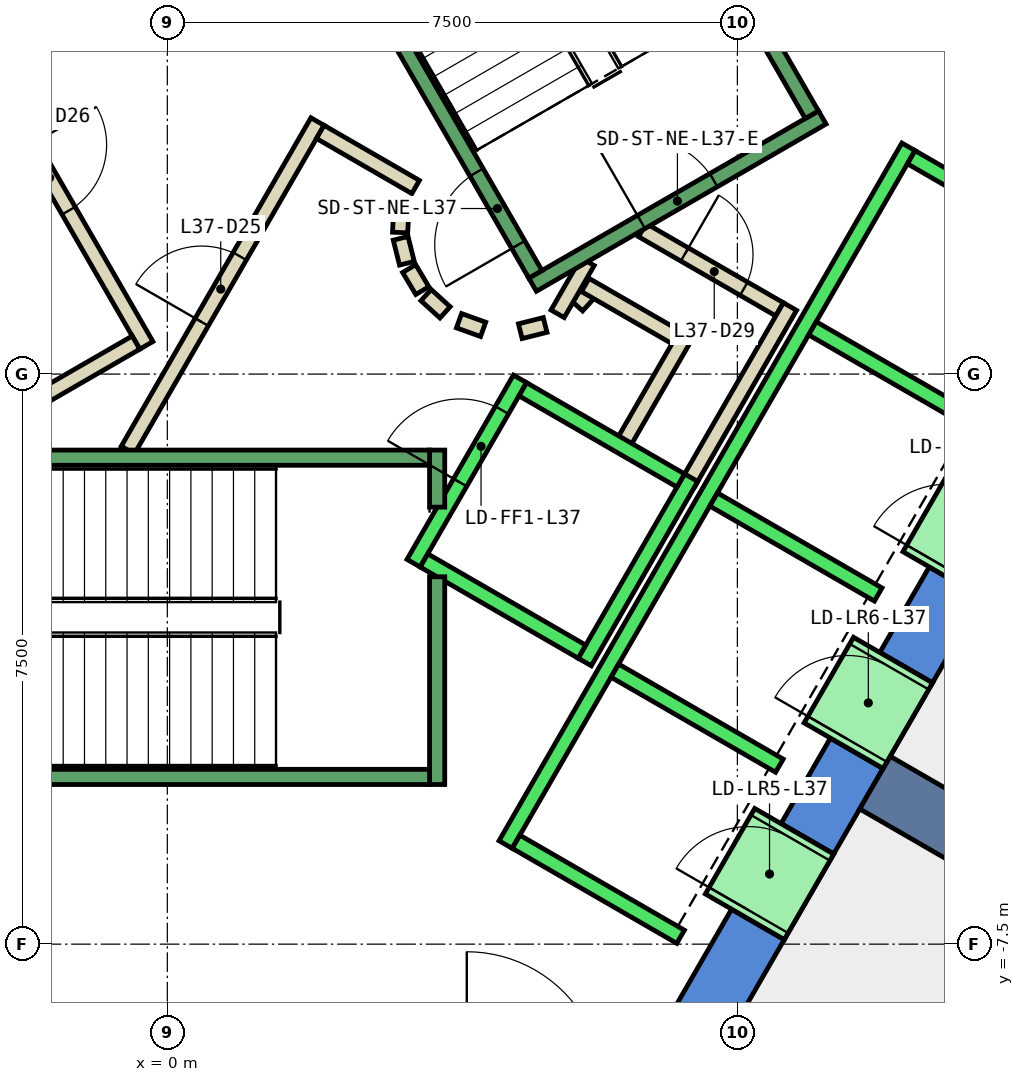
"""IFC4 building model, lengths in metres.
Left out: names, types, materials, properties, quantities, classifications, styles, units other than length and angle.
Written with IfcOpenShell. Run it as: python <this file> out.ifc"""

import sys

from ifc_helpers import new_model, si_unit, direction, frame, frame_2d, origin, place, context, subcontext, project, spatial, polyline, rectangle, outline, extrude, element, fill, save


model = new_model("IFC4")
c1 = context("Model", 3, precision=1e-05, world=origin(), true_north=direction((0.0, 1.0)))
c2 = subcontext(c1, "Body", "Model", "MODEL_VIEW")
j1 = project(units=[si_unit("LENGTHUNIT", "METRE"), si_unit("PLANEANGLEUNIT", "RADIAN")], contexts=[c1])
p1 = place(None, origin())
s1 = spatial("IfcSite", under=j1, at=p1, CompositionType="ELEMENT")
p2 = place(p1, origin())
s2 = spatial("IfcBuilding", under=s1, at=p2, CompositionType="ELEMENT")
p3 = place(p2, frame((0.0, 0.0, 167.6)))
s3 = spatial("IfcBuildingStorey", under=s2, at=p3, CompositionType="ELEMENT", Elevation=167.6)
p4 = place(p3, frame((0.0, 0.0, -0.4)))
e1 = element("IfcWall", 1, at=p4, inside=s3, PredefinedType="SHEAR", context=c2, shape_type="SweptSolid", body=[
    extrude(outline(polyline([(8.517, 11.748), (7.824, 11.348), (12.933, 2.5), (13.856, 2.5), (8.517, 11.748)])), origin(), (0.0, 0.0, 1.0), 4.2),
])
p5 = place(p3, frame((0.0, 0.0, -0.4)))
e2 = element("IfcWall", 2, at=p5, inside=s3, PredefinedType="SHEAR", context=c2, shape_type="SweptSolid", body=[
    extrude(outline(polyline([(8.117, -7.44), (7.424, -7.04), (6.466, -8.7), (6.928, -9.5), (8.117, -7.44)])), origin(), (0.0, 0.0, 1.0), 4.2),
])
p6 = place(p3, frame((0.0, 0.0, -0.4)))
e3 = element("IfcWall", 3, at=p6, inside=s3, PredefinedType="SHEAR", context=c2, shape_type="SweptSolid", body=[
    extrude(outline(polyline([(9.417, -5.189), (8.724, -4.789), (8.075, -5.914), (8.767, -6.314), (9.417, -5.189)])), origin(), (0.0, 0.0, 1.0), 4.2),
])
p7 = place(p3, frame((0.0, 0.0, -0.4)))
e4 = element("IfcWall", 4, at=p7, inside=s3, PredefinedType="SHEAR", context=c2, shape_type="SweptSolid", body=[
    extrude(outline(polyline([(10.717, -2.937), (10.025, -2.537), (9.374, -3.663), (10.067, -4.063), (10.717, -2.937)])), origin(), (0.0, 0.0, 1.0), 4.2),
])
p8 = place(p3, frame((0.0, 0.0, 3.6)))
e5 = element("IfcWall", 5, at=p8, inside=s3, PredefinedType="SHEAR", context=c2, shape_type="SweptSolid", body=[
    extrude(outline(polyline([(8.767, -6.314), (8.075, -5.914), (7.424, -7.04), (8.117, -7.44), (8.767, -6.314)])), origin(), (0.0, 0.0, 1.0), 0.2),
])
p9 = place(p3, frame((0.0, 0.0, 3.6)))
e6 = element("IfcWall", 6, at=p9, inside=s3, PredefinedType="SHEAR", context=c2, shape_type="SweptSolid", body=[
    extrude(outline(polyline([(10.067, -4.063), (9.374, -3.663), (8.724, -4.789), (9.417, -5.189), (10.067, -4.063)])), origin(), (0.0, 0.0, 1.0), 0.2),
])
p10 = place(p3, frame((0.0, 0.0, 3.6)))
e7 = element("IfcWall", 7, at=p10, inside=s3, PredefinedType="SHEAR", context=c2, shape_type="SweptSolid", body=[
    extrude(outline(polyline([(11.367, -1.811), (10.675, -1.411), (10.025, -2.537), (10.717, -2.937), (11.367, -1.811)])), origin(), (0.0, 0.0, 1.0), 0.2),
])
p11 = place(p3, frame((9.31, -5.375, -0.4), z_axis=(0.0, 0.0, 1.0), x_axis=(0.866017533419, -0.500013631625, 0.0)))
e8 = element("IfcWall", 8, at=p11, inside=s3, PredefinedType="SHEAR", context=c2, shape_type="SweptSolid", body=[
    extrude(rectangle(XDim=9.0, YDim=0.8, at=frame_2d((4.5, 0.0))), origin(), (0.0, 0.0, 1.0), 4.2),
])
p12 = place(p3, frame((5.39, 0.898, 0.0), z_axis=(0.0, 0.0, 1.0), x_axis=(0.673828488714, 0.738887791073, 0.0)))
e9 = element("IfcWall", 9, at=p12, inside=s3, PredefinedType="PARTITIONING", context=c2, shape_type="SweptSolid", body=[
    extrude(rectangle(XDim=0.263, YDim=0.2, at=frame_2d((0.131, 0.0))), origin(), (0.0, 0.0, 1.0), 3.8),
])
p13 = place(p3, frame((5.499, 1.172, 0.0), z_axis=(0.0, 0.0, 1.0), x_axis=(0.866333505267, -0.499465972466, 0.0)))
e10 = element("IfcWall", 10, at=p13, inside=s3, PredefinedType="PARTITIONING", context=c2, shape_type="SweptSolid", body=[
    extrude(rectangle(XDim=1.374, YDim=0.2, at=frame_2d((0.687, 0.0))), origin(), (0.0, 0.0, 1.0), 3.8),
])
p14 = place(p3, frame((6.826, 0.522, 0.0), z_axis=(0.0, 0.0, 1.0), x_axis=(-0.500016722714, -0.866015748706, 0.0)))
e11 = element("IfcWall", 11, at=p14, inside=s3, PredefinedType="PARTITIONING", context=c2, shape_type="SweptSolid", body=[
    extrude(rectangle(XDim=1.7, YDim=0.2, at=frame_2d((0.85, 0.0))), origin(), (0.0, 0.0, 1.0), 3.8),
])
p15 = place(p3, frame((6.25, 1.894, 0.0), z_axis=(0.0, 0.0, 1.0), x_axis=(0.866043184279, -0.499969202016, 0.0)))
e12 = element("IfcWall", 12, at=p15, inside=s3, PredefinedType="PARTITIONING", context=c2, shape_type="SweptSolid", body=[
    extrude(rectangle(XDim=2.084, YDim=0.2, at=frame_2d((1.042, 0.0))), origin(), (0.0, 0.0, 1.0), 3.8),
])
p16 = place(p15, frame((0.642, 0.0, 0.0)))
e13 = element("IfcOpeningElement", 13, at=p16, cuts=e12, PredefinedType="OPENING", context=c2, shape_type="SweptSolid", body=[
    extrude(rectangle(XDim=0.9, YDim=2.1, at=frame_2d((0.45, 1.05))), frame((0.0, 0.11, 0.0), z_axis=(0.0, -1.0, 0.0), x_axis=(1.0, 0.0, 0.0)), (0.0, 0.0, 1.0), 0.22),
])
p17 = place(p3, frame((8.192, 0.888, 0.0), z_axis=(0.0, 0.0, 1.0), x_axis=(-0.499940625693, -0.866059680843, 0.0)))
e14 = element("IfcWall", 14, at=p17, inside=s3, PredefinedType="PARTITIONING", context=c2, shape_type="SweptSolid", body=[
    extrude(rectangle(XDim=2.68, YDim=0.2, at=frame_2d((1.34, 0.0))), origin(), (0.0, 0.0, 1.0), 3.8),
])
p18 = place(p3, frame((5.135, 0.793, 0.0), z_axis=(0.0, 0.0, 1.0), x_axis=(0.499526442893, 0.866298639529, 0.0)))
e15 = element("IfcWall", 15, at=p18, inside=s3, PredefinedType="PARTITIONING", context=c2, shape_type="SweptSolid", body=[
    extrude(rectangle(XDim=0.791, YDim=0.2, at=frame_2d((0.396, 0.0))), origin(), (0.0, 0.0, 1.0), 3.8),
])
p19 = place(p3, frame((-0.52, -1.0, 0.0), z_axis=(0.0, 0.0, 1.0), x_axis=(0.50011622646, 0.865958290007, 0.0)))
e16 = element("IfcWall", 16, at=p19, inside=s3, PredefinedType="PARTITIONING", context=c2, shape_type="SweptSolid", body=[
    extrude(rectangle(XDim=4.991, YDim=0.2, at=frame_2d((2.496, 0.0))), origin(), (0.0, 0.0, 1.0), 3.8),
])
p20 = place(p19, frame((1.945, 0.0, 0.0)))
e17 = element("IfcOpeningElement", 17, at=p20, cuts=e16, PredefinedType="OPENING", context=c2, shape_type="SweptSolid", body=[
    extrude(rectangle(XDim=1.0, YDim=2.1, at=frame_2d((0.5, 1.05))), frame((0.0, 0.11, 0.0), z_axis=(0.0, -1.0, 0.0), x_axis=(1.0, 0.0, 0.0)), (0.0, 0.0, 1.0), 0.22),
])
p21 = place(p3, frame((2.012, 3.186, 0.0), z_axis=(0.0, 0.0, 1.0), x_axis=(0.865891012941, -0.500232699559, 0.0)))
e18 = element("IfcWall", 18, at=p21, inside=s3, PredefinedType="PARTITIONING", context=c2, shape_type="SweptSolid", body=[
    extrude(rectangle(XDim=1.449, YDim=0.2, at=frame_2d((0.725, 0.0))), origin(), (0.0, 0.0, 1.0), 3.8),
])
p22 = place(p3, frame((3.079, 2.199, 0.0), z_axis=(0.0, 0.0, 1.0), x_axis=(-0.047771483479, -0.998858290933, 0.0)))
e19 = element("IfcWall", 19, at=p22, inside=s3, PredefinedType="PARTITIONING", context=c2, shape_type="SweptSolid", body=[
    extrude(rectangle(XDim=0.337, YDim=0.2, at=frame_2d((0.169, 0.0))), origin(), (0.0, 0.0, 1.0), 3.8),
])
p23 = place(p3, frame((3.07, 1.786, 0.0), z_axis=(0.0, 0.0, 1.0), x_axis=(0.242705583207, -0.970099994784, 0.0)))
e20 = element("IfcWall", 20, at=p23, inside=s3, PredefinedType="PARTITIONING", context=c2, shape_type="SweptSolid", body=[
    extrude(rectangle(XDim=0.338, YDim=0.2, at=frame_2d((0.169, 0.0))), origin(), (0.0, 0.0, 1.0), 3.8),
])
for number, where, z_axis, x_axis in (
    (21, (3.182, 1.388, 0.0), (0.0, 0.0, 1.0), (0.512, -0.859, 0.0)),
    (22, (3.404, 1.039, 0.0), (0.0, 0.0, 1.0), (0.74, -0.672, 0.0)),
):
    element("IfcWall", number, at=place(p3, frame(where, z_axis=z_axis, x_axis=x_axis)), inside=s3, PredefinedType="PARTITIONING", context=c2, shape_type="SweptSolid", body=[
        extrude(rectangle(XDim=0.338, YDim=0.2, at=frame_2d((0.169, 0.0))), origin(), (0.0, 0.0, 1.0), 3.8),
    ])
p24 = place(p3, frame((3.838, 0.702, 0.0), z_axis=(0.0, 0.0, 1.0), x_axis=(0.941035081519, -0.338308993895, 0.0)))
e23 = element("IfcWall", 23, at=p24, inside=s3, PredefinedType="PARTITIONING", context=c2, shape_type="SweptSolid", body=[
    extrude(rectangle(XDim=0.337, YDim=0.2, at=frame_2d((0.168, 0.0))), origin(), (0.0, 0.0, 1.0), 3.8),
])
p25 = place(p3, frame((4.644, 0.564, 0.0), z_axis=(0.0, 0.0, 1.0), x_axis=(0.969929076366, 0.243387729394, 0.0)))
e24 = element("IfcWall", 24, at=p25, inside=s3, PredefinedType="PARTITIONING", context=c2, shape_type="SweptSolid", body=[
    extrude(rectangle(XDim=0.337, YDim=0.2, at=frame_2d((0.168, 0.0))), origin(), (0.0, 0.0, 1.0), 3.8),
])
p26 = place(p3, frame((-2.771, 4.7, 0.0), z_axis=(0.0, 0.0, 1.0), x_axis=(0.499969479948, -0.866043023828, 0.0)))
e25 = element("IfcWall", 25, at=p26, inside=s3, PredefinedType="PARTITIONING", context=c2, shape_type="SweptSolid", body=[
    extrude(rectangle(XDim=4.99, YDim=0.2, at=frame_2d((2.495, 0.0))), origin(), (0.0, 0.0, 1.0), 3.8),
])
p27 = place(p26, frame((1.945, 0.0, 0.0)))
e26 = element("IfcOpeningElement", 26, at=p27, cuts=e25, PredefinedType="OPENING", context=c2, shape_type="SweptSolid", body=[
    extrude(rectangle(XDim=1.0, YDim=2.1, at=frame_2d((0.5, 1.05))), frame((0.0, 0.11, 0.0), z_axis=(0.0, -1.0, 0.0), x_axis=(1.0, 0.0, 0.0)), (0.0, 0.0, 1.0), 0.22),
])
p28 = place(p3, frame((-0.412, 0.414, 0.0), z_axis=(0.0, 0.0, 1.0), x_axis=(-0.866017369001, -0.500013916395, 0.0)))
e27 = element("IfcWall", 27, at=p28, inside=s3, PredefinedType="PARTITIONING", context=c2, shape_type="SweptSolid", body=[
    extrude(rectangle(XDim=1.45, YDim=0.2, at=frame_2d((0.725, 0.0))), origin(), (0.0, 0.0, 1.0), 3.8),
])
p29 = place(p3, frame((12.401, -7.621, 0.0), z_axis=(0.0, 0.0, 1.0), x_axis=(-0.499983724212, -0.866034800411, 0.0)))
e28 = element("IfcWall", 28, at=p29, inside=s3, PredefinedType="PARTITIONING", context=c2, shape_type="SweptSolid", body=[
    extrude(rectangle(XDim=9.302, YDim=0.2, at=frame_2d((4.651, 0.0))), origin(), (0.0, 0.0, 1.0), 3.8),
])
p30 = place(p3, frame((3.24, -2.488, 0.0), z_axis=(0.0, 0.0, 1.0), x_axis=(0.49994636267, 0.866056369097, 0.0)))
e29 = element("IfcWall", 29, at=p30, inside=s3, PredefinedType="STANDARD", context=c2, shape_type="SweptSolid", body=[
    extrude(rectangle(XDim=2.8, YDim=0.2, at=frame_2d((1.4, 0.0))), origin(), (0.0, 0.0, 1.0), 3.8),
])
p31 = place(p30, frame((1.225, 0.0, 0.0)))
e30 = element("IfcOpeningElement", 30, at=p31, cuts=e29, PredefinedType="OPENING", context=c2, shape_type="SweptSolid", body=[
    extrude(rectangle(XDim=1.1, YDim=2.1, at=frame_2d((0.55, 1.05))), frame((0.0, 0.11, 0.0), z_axis=(0.0, -1.0, 0.0), x_axis=(1.0, 0.0, 0.0)), (0.0, 0.0, 1.0), 0.22),
])
p32 = place(p3, frame((5.492, -3.788, 0.0), z_axis=(0.0, 0.0, 1.0), x_axis=(0.500011755427, 0.866018616679, 0.0)))
e31 = element("IfcWall", 31, at=p32, inside=s3, PredefinedType="STANDARD", context=c2, shape_type="SweptSolid", body=[
    extrude(rectangle(XDim=2.8, YDim=0.2, at=frame_2d((1.4, 0.0))), origin(), (0.0, 0.0, 1.0), 3.8),
])
p33 = place(p3, frame((3.377, -2.452, 0.0), z_axis=(0.0, 0.0, 1.0), x_axis=(0.865955154139, -0.50012165622, 0.0)))
e32 = element("IfcWall", 32, at=p33, inside=s3, PredefinedType="STANDARD", context=c2, shape_type="SweptSolid", body=[
    extrude(rectangle(XDim=2.4, YDim=0.2, at=frame_2d((1.2, 0.0))), origin(), (0.0, 0.0, 1.0), 3.8),
])
p34 = place(p3, frame((4.677, -0.2, 0.0), z_axis=(0.0, 0.0, 1.0), x_axis=(0.865973769406, -0.500089422704, 0.0)))
e33 = element("IfcWall", 33, at=p34, inside=s3, PredefinedType="STANDARD", context=c2, shape_type="SweptSolid", body=[
    extrude(rectangle(XDim=2.399, YDim=0.2, at=frame_2d((1.2, 0.0))), origin(), (0.0, 0.0, 1.0), 3.8),
])
p35 = place(p3, frame((4.451, -6.19, 0.0), z_axis=(0.0, 0.0, 1.0), x_axis=(0.50000090737, 0.866024879913, 0.0)))
e34 = element("IfcWall", 34, at=p35, inside=s3, PredefinedType="STANDARD", context=c2, shape_type="SweptSolid", body=[
    extrude(rectangle(XDim=10.6, YDim=0.2, at=frame_2d((5.3, 0.0))), origin(), (0.0, 0.0, 1.0), 3.8),
])
for number, where, z_axis, x_axis in (
    (35, (4.588, -6.153, 0.0), (0.0, 0.0, 1.0), (0.866, -0.5, 0.0)),
    (36, (5.888, -3.902, 0.0), (0.0, 0.0, 1.0), (0.866, -0.5, 0.0)),
    (37, (7.188, -1.65, 0.0), (0.0, 0.0, 1.0), (0.866, -0.5, 0.0)),
    (38, (8.488, 0.602, 0.0), (0.0, 0.0, 1.0), (0.866, -0.5, 0.0)),
):
    element("IfcWall", number, at=place(p3, frame(where, z_axis=z_axis, x_axis=x_axis)), inside=s3, PredefinedType="STANDARD", context=c2, shape_type="SweptSolid", body=[
        extrude(rectangle(XDim=2.5, YDim=0.2, at=frame_2d((1.25, 0.0))), origin(), (0.0, 0.0, 1.0), 3.8),
    ])
p36 = place(p3, frame((9.788, 2.853, 0.0), z_axis=(0.0, 0.0, 1.0), x_axis=(0.865998541277, -0.500046524342, 0.0)))
e39 = element("IfcWall", 39, at=p36, inside=s3, PredefinedType="STANDARD", context=c2, shape_type="SweptSolid", body=[
    extrude(rectangle(XDim=2.5, YDim=0.2, at=frame_2d((1.25, 0.0))), origin(), (0.0, 0.0, 1.0), 3.8),
])
p37 = place(p3, frame((7.598, -7.14, 0.0), z_axis=(0.0, 0.0, 1.0), x_axis=(0.500362116554, 0.865816234728, 0.0)))
e40 = element("IfcWall", 40, at=p37, inside=s3, PredefinedType="STANDARD", context=c2, shape_type="SweptSolid", body=[
    extrude(rectangle(XDim=1.299, YDim=1.2, at=frame_2d((0.65, 0.0))), origin(), (0.0, 0.0, 1.0), 2.4),
])
p38 = place(p37, frame((0.1, 0.0, 0.0)))
e41 = element("IfcOpeningElement", 41, at=p38, cuts=e40, PredefinedType="OPENING", context=c2, shape_type="SweptSolid", body=[
    extrude(rectangle(XDim=1.1, YDim=2.3, at=frame_2d((0.55, 1.15))), frame((0.0, 0.61, 0.0), z_axis=(0.0, -1.0, 0.0), x_axis=(1.0, 0.0, 0.0)), (0.0, 0.0, 1.0), 1.22),
])
p39 = place(p3, frame((8.898, -4.889, 0.0), z_axis=(0.0, 0.0, 1.0), x_axis=(0.500036693733, 0.866004217611, 0.0)))
e42 = element("IfcWall", 42, at=p39, inside=s3, PredefinedType="STANDARD", context=c2, shape_type="SweptSolid", body=[
    extrude(rectangle(XDim=1.3, YDim=1.2, at=frame_2d((0.65, 0.0))), origin(), (0.0, 0.0, 1.0), 2.4),
])
p40 = place(p39, frame((0.1, 0.0, 0.0)))
e43 = element("IfcOpeningElement", 43, at=p40, cuts=e42, PredefinedType="OPENING", context=c2, shape_type="SweptSolid", body=[
    extrude(rectangle(XDim=1.1, YDim=2.3, at=frame_2d((0.55, 1.15))), frame((0.0, 0.61, 0.0), z_axis=(0.0, -1.0, 0.0), x_axis=(1.0, 0.0, 0.0)), (0.0, 0.0, 1.0), 1.22),
])
p41 = place(p3, frame((10.198, -2.637, 0.0), z_axis=(0.0, 0.0, 1.0), x_axis=(0.49989585183, 0.866085525409, 0.0)))
e44 = element("IfcWall", 44, at=p41, inside=s3, PredefinedType="STANDARD", context=c2, shape_type="SweptSolid", body=[
    extrude(rectangle(XDim=1.3, YDim=1.2, at=frame_2d((0.65, 0.0))), origin(), (0.0, 0.0, 1.0), 2.4),
])
p42 = place(p41, frame((0.1, 0.0, 0.0)))
e45 = element("IfcOpeningElement", 45, at=p42, cuts=e44, PredefinedType="OPENING", context=c2, shape_type="SweptSolid", body=[
    extrude(rectangle(XDim=1.1, YDim=2.3, at=frame_2d((0.55, 1.15))), frame((0.0, 0.61, 0.0), z_axis=(0.0, -1.0, 0.0), x_axis=(1.0, 0.0, 0.0)), (0.0, 0.0, 1.0), 1.22),
])
p43 = place(p3, frame((3.55, -2.667, 0.0), z_axis=(0.0, 0.0, 1.0), x_axis=(0.0, -1.0, 0.0)))
e46 = element("IfcWall", 46, at=p43, inside=s3, PredefinedType="STANDARD", context=c2, shape_type="SweptSolid", body=[
    extrude(rectangle(XDim=2.733, YDim=0.2, at=frame_2d((1.366, 0.0))), origin(), (0.0, 0.0, 1.0), 3.8),
])
p44 = place(p3, frame((3.55, -1.0, 0.0), z_axis=(0.0, 0.0, 1.0), x_axis=(0.0, -1.0, 0.0)))
e47 = element("IfcWall", 47, at=p44, inside=s3, PredefinedType="STANDARD", context=c2, shape_type="SweptSolid", body=[
    extrude(rectangle(XDim=0.751, YDim=0.2, at=frame_2d((0.375, 0.0))), origin(), (0.0, 0.0, 1.0), 3.8),
])
p45 = place(p3, frame((-3.45, -1.1, 0.0), z_axis=(0.0, 0.0, 1.0), x_axis=(1.0, 0.0, 0.0)))
e48 = element("IfcWall", 48, at=p45, inside=s3, PredefinedType="STANDARD", context=c2, shape_type="SweptSolid", body=[
    extrude(rectangle(XDim=6.9, YDim=0.2, at=frame_2d((3.45, 0.0))), origin(), (0.0, 0.0, 1.0), 3.8),
])
p46 = place(p45, frame((0.45, 0.0, 0.0)))
e49 = element("IfcOpeningElement", 49, at=p46, cuts=e48, PredefinedType="OPENING", context=c2, shape_type="SweptSolid", body=[
    extrude(rectangle(XDim=1.1, YDim=2.2, at=frame_2d((0.55, 1.1))), frame((0.0, 0.11, 0.0), z_axis=(0.0, -1.0, 0.0), x_axis=(1.0, 0.0, 0.0)), (0.0, 0.0, 1.0), 0.22),
])
p47 = place(p3, frame((-3.45, -5.3, 0.0), z_axis=(0.0, 0.0, 1.0), x_axis=(1.0, 0.0, 0.0)))
e50 = element("IfcWall", 50, at=p47, inside=s3, PredefinedType="STANDARD", context=c2, shape_type="SweptSolid", body=[
    extrude(rectangle(XDim=6.9, YDim=0.2, at=frame_2d((3.45, 0.0))), origin(), (0.0, 0.0, 1.0), 3.8),
])
p48 = place(p3, frame((4.806, 1.176, 0.0), z_axis=(0.0, 0.0, 1.0), x_axis=(0.866059941101, 0.499940174841, 0.0)))
e51 = element("IfcWall", 51, at=p48, inside=s3, PredefinedType="STANDARD", context=c2, shape_type="SweptSolid", body=[
    extrude(rectangle(XDim=4.4, YDim=0.2, at=frame_2d((2.2, 0.0))), origin(), (0.0, 0.0, 1.0), 3.8),
])
p49 = place(p48, frame((1.65, 0.0, 0.0)))
e52 = element("IfcOpeningElement", 52, at=p49, cuts=e51, PredefinedType="OPENING", context=c2, shape_type="SweptSolid", body=[
    extrude(rectangle(XDim=1.1, YDim=2.2, at=frame_2d((0.55, 1.1))), frame((0.0, 0.11, 0.0), z_axis=(0.0, -1.0, 0.0), x_axis=(1.0, 0.0, 0.0)), (0.0, 0.0, 1.0), 0.22),
])
p50 = place(p3, frame((4.843, 1.312, 0.0), z_axis=(0.0, 0.0, 1.0), x_axis=(-0.499963383562, 0.866046543262, 0.0)))
e53 = element("IfcWall", 53, at=p50, inside=s3, PredefinedType="STANDARD", context=c2, shape_type="SweptSolid", body=[
    extrude(rectangle(XDim=6.9, YDim=0.2, at=frame_2d((3.45, 0.0))), origin(), (0.0, 0.0, 1.0), 3.8),
])
p51 = place(p50, frame((0.45, 0.0, 0.0)))
e54 = element("IfcOpeningElement", 54, at=p51, cuts=e53, PredefinedType="OPENING", context=c2, shape_type="SweptSolid", body=[
    extrude(rectangle(XDim=1.1, YDim=2.2, at=frame_2d((0.55, 1.1))), frame((0.0, 0.11, 0.0), z_axis=(0.0, -1.0, 0.0), x_axis=(1.0, 0.0, 0.0)), (0.0, 0.0, 1.0), 0.22),
])
p52 = place(p3, frame((8.48, 3.412, 0.0), z_axis=(0.0, 0.0, 1.0), x_axis=(-0.499978703459, 0.866037698999, 0.0)))
e55 = element("IfcWall", 55, at=p52, inside=s3, PredefinedType="STANDARD", context=c2, shape_type="SweptSolid", body=[
    extrude(rectangle(XDim=6.9, YDim=0.2, at=frame_2d((3.45, 0.0))), origin(), (0.0, 0.0, 1.0), 3.8),
])
p53 = place(p3, frame((-1.393, 7.288, 0.0), z_axis=(0.0, 0.0, 1.0), x_axis=(-0.499963383562, -0.866046543262, 0.0)))
e56 = element("IfcWall", 56, at=p53, inside=s3, PredefinedType="STANDARD", context=c2, shape_type="SweptSolid", body=[
    extrude(rectangle(XDim=6.9, YDim=0.2, at=frame_2d((3.45, 0.0))), origin(), (0.0, 0.0, 1.0), 3.8),
])
p54 = place(p53, frame((0.45, 0.0, 0.0)))
e57 = element("IfcOpeningElement", 57, at=p54, cuts=e56, PredefinedType="OPENING", context=c2, shape_type="SweptSolid", body=[
    extrude(rectangle(XDim=1.1, YDim=2.2, at=frame_2d((0.55, 1.1))), frame((0.0, 0.11, 0.0), z_axis=(0.0, -1.0, 0.0), x_axis=(1.0, 0.0, 0.0)), (0.0, 0.0, 1.0), 0.22),
])
p55 = place(p20, origin())
e58 = element("IfcDoor", 58, at=p55, inside=s3, OperationType="SINGLE_SWING_LEFT", PredefinedType="DOOR", context=c2, shape_type="SweptSolid", body=[
    extrude(rectangle(XDim=1.0, YDim=2.1, at=frame_2d((0.5, 1.05))), frame((0.0, 0.025, 0.0), z_axis=(0.0, -1.0, 0.0), x_axis=(1.0, 0.0, 0.0)), (0.0, 0.0, 1.0), 0.05),
])
fill(e17, e58)
p56 = place(p27, origin())
e59 = element("IfcDoor", 59, at=p56, inside=s3, OperationType="SINGLE_SWING_RIGHT", PredefinedType="DOOR", context=c2, shape_type="SweptSolid", body=[
    extrude(rectangle(XDim=1.0, YDim=2.1, at=frame_2d((0.5, 1.05))), frame((0.0, 0.025, 0.0), z_axis=(0.0, -1.0, 0.0), x_axis=(1.0, 0.0, 0.0)), (0.0, 0.0, 1.0), 0.05),
])
fill(e26, e59)
p57 = place(p16, origin())
e60 = element("IfcDoor", 60, at=p57, inside=s3, OperationType="SINGLE_SWING_LEFT", PredefinedType="DOOR", context=c2, shape_type="SweptSolid", body=[
    extrude(rectangle(XDim=0.9, YDim=2.1, at=frame_2d((0.45, 1.05))), frame((0.0, 0.025, 0.0), z_axis=(0.0, -1.0, 0.0), x_axis=(1.0, 0.0, 0.0)), (0.0, 0.0, 1.0), 0.05),
])
fill(e13, e60)
p58 = place(p38, origin())
e61 = element("IfcDoor", 61, at=p58, inside=s3, OperationType="SLIDING_TO_LEFT", PredefinedType="DOOR", context=c2, shape_type="SweptSolid", body=[
    extrude(rectangle(XDim=1.1, YDim=2.3, at=frame_2d((0.55, 1.15))), frame((0.0, 0.025, 0.0), z_axis=(0.0, -1.0, 0.0), x_axis=(1.0, 0.0, 0.0)), (0.0, 0.0, 1.0), 0.05),
])
fill(e41, e61)
p59 = place(p40, origin())
e62 = element("IfcDoor", 62, at=p59, inside=s3, OperationType="SLIDING_TO_LEFT", PredefinedType="DOOR", context=c2, shape_type="SweptSolid", body=[
    extrude(rectangle(XDim=1.1, YDim=2.3, at=frame_2d((0.55, 1.15))), frame((0.0, 0.025, 0.0), z_axis=(0.0, -1.0, 0.0), x_axis=(1.0, 0.0, 0.0)), (0.0, 0.0, 1.0), 0.05),
])
fill(e43, e62)
p60 = place(p31, origin())
e63 = element("IfcDoor", 63, at=p60, inside=s3, OperationType="SLIDING_TO_LEFT", PredefinedType="DOOR", context=c2, shape_type="SweptSolid", body=[
    extrude(rectangle(XDim=1.1, YDim=2.1, at=frame_2d((0.55, 1.05))), frame((0.0, 0.025, 0.0), z_axis=(0.0, -1.0, 0.0), x_axis=(1.0, 0.0, 0.0)), (0.0, 0.0, 1.0), 0.05),
])
fill(e30, e63)
p61 = place(p51, origin())
e64 = element("IfcDoor", 64, at=p61, inside=s3, OperationType="SINGLE_SWING_LEFT", PredefinedType="DOOR", context=c2, shape_type="SweptSolid", body=[
    extrude(rectangle(XDim=1.1, YDim=2.2, at=frame_2d((0.55, 1.1))), frame((0.0, 0.025, 0.0), z_axis=(0.0, -1.0, 0.0), x_axis=(1.0, 0.0, 0.0)), (0.0, 0.0, 1.0), 0.05),
])
fill(e54, e64)
p62 = place(p49, origin())
e65 = element("IfcDoor", 65, at=p62, inside=s3, OperationType="SINGLE_SWING_LEFT", PredefinedType="DOOR", context=c2, shape_type="SweptSolid", body=[
    extrude(rectangle(XDim=1.1, YDim=2.2, at=frame_2d((0.55, 1.1))), frame((0.0, 0.025, 0.0), z_axis=(0.0, -1.0, 0.0), x_axis=(1.0, 0.0, 0.0)), (0.0, 0.0, 1.0), 0.05),
])
fill(e52, e65)
save(model, sys.argv[1])
